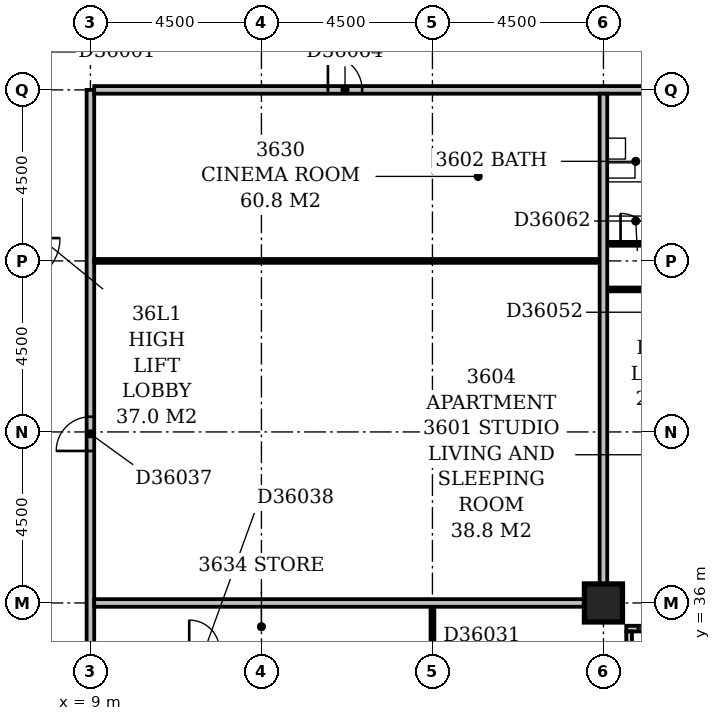
"""IFC4 building model, lengths in metres.
Left out: names, types, materials, properties, quantities, classifications, styles, units other than length and angle.
Written with IfcOpenShell. Run it as: python <this file> out.ifc"""

import sys

from ifc_helpers import new_model, si_unit, direction, frame, frame_2d, origin, origin_2d, place, context, subcontext, project, spatial, rectangle, extrude, element, fill, save


model = new_model("IFC4")
c1 = context("Model", 3, precision=1e-05, world=origin(), true_north=direction((0.0, 1.0)))
c2 = subcontext(c1, "Body", "Model", "MODEL_VIEW")
j1 = project(units=[si_unit("LENGTHUNIT", "METRE"), si_unit("PLANEANGLEUNIT", "RADIAN")], contexts=[c1])
p1 = place(None, origin())
s1 = spatial("IfcSite", under=j1, at=p1, CompositionType="ELEMENT")
p2 = place(p1, origin())
s2 = spatial("IfcBuilding", under=s1, at=p2, CompositionType="ELEMENT")
p3 = place(p2, frame((0.0, 0.0, 144.8)))
s3 = spatial("IfcBuildingStorey", under=s2, at=p3, CompositionType="ELEMENT", Elevation=144.8)
p4 = place(p3, frame((22.5, 36.0, -0.3), z_axis=(0.0, 0.0, 1.0), x_axis=(1.0, 0.0, 0.0)))
e1 = element("IfcColumn", 1, at=p4, inside=s3, PredefinedType="COLUMN", context=c2, shape_type="SweptSolid", body=[
    extrude(rectangle(XDim=1.0, YDim=1.0, at=origin_2d()), origin(), (0.0, 0.0, 1.0), 3.6),
])
p5 = place(p3, frame((23.175, 17.4, 0.0), z_axis=(0.0, 0.0, 1.0), x_axis=(0.0, 1.0, 0.0)))
e2 = element("IfcWall", 2, at=p5, inside=s3, PredefinedType="STANDARD", context=c2, shape_type="SweptSolid", body=[
    extrude(rectangle(XDim=17.85, YDim=0.15, at=frame_2d((8.925, 0.0))), origin(), (0.0, 0.0, 1.0), 2.7),
])
p6 = place(p5, frame((1.432, 0.0, 0.6)))
e3 = element("IfcOpeningElement", 3, at=p6, cuts=e2, PredefinedType="OPENING", context=c2, shape_type="SweptSolid", body=[
    extrude(rectangle(XDim=2.4, YDim=1.8, at=frame_2d((1.2, 0.9))), frame((0.0, 0.087, 0.0), z_axis=(0.0, -1.0, 0.0), x_axis=(1.0, 0.0, 0.0)), (0.0, 0.0, 1.0), 0.174),
])
p7 = place(p5, frame((6.15, 0.0, 0.6)))
e4 = element("IfcOpeningElement", 4, at=p7, cuts=e2, PredefinedType="OPENING", context=c2, shape_type="SweptSolid", body=[
    extrude(rectangle(XDim=2.4, YDim=1.8, at=frame_2d((1.2, 0.9))), frame((0.0, 0.087, 0.0), z_axis=(0.0, -1.0, 0.0), x_axis=(1.0, 0.0, 0.0)), (0.0, 0.0, 1.0), 0.174),
])
p8 = place(p5, frame((10.65, 0.0, 0.6)))
e5 = element("IfcOpeningElement", 5, at=p8, cuts=e2, PredefinedType="OPENING", context=c2, shape_type="SweptSolid", body=[
    extrude(rectangle(XDim=2.4, YDim=1.8, at=frame_2d((1.2, 0.9))), frame((0.0, 0.087, 0.0), z_axis=(0.0, -1.0, 0.0), x_axis=(1.0, 0.0, 0.0)), (0.0, 0.0, 1.0), 0.174),
])
p9 = place(p5, frame((15.15, 0.0, 0.6)))
e6 = element("IfcOpeningElement", 6, at=p9, cuts=e2, PredefinedType="OPENING", context=c2, shape_type="SweptSolid", body=[
    extrude(rectangle(XDim=2.4, YDim=1.8, at=frame_2d((1.2, 0.9))), frame((0.0, 0.087, 0.0), z_axis=(0.0, -1.0, 0.0), x_axis=(1.0, 0.0, 0.0)), (0.0, 0.0, 1.0), 0.174),
])
p10 = place(p3, frame((23.1, 35.325, 0.0), z_axis=(0.0, 0.0, 1.0), x_axis=(1.0, 0.0, 0.0)))
e7 = element("IfcWall", 7, at=p10, inside=s3, PredefinedType="STANDARD", context=c2, shape_type="SweptSolid", body=[
    extrude(rectangle(XDim=45.15, YDim=0.15, at=frame_2d((22.575, 0.0))), origin(), (0.0, 0.0, 1.0), 2.7),
])
p11 = place(p10, frame((0.306, 0.0, 0.6)))
e8 = element("IfcOpeningElement", 8, at=p11, cuts=e7, PredefinedType="OPENING", context=c2, shape_type="SweptSolid", body=[
    extrude(rectangle(XDim=2.4, YDim=1.8, at=frame_2d((1.2, 0.9))), frame((0.0, 0.087, 0.0), z_axis=(0.0, -1.0, 0.0), x_axis=(1.0, 0.0, 0.0)), (0.0, 0.0, 1.0), 0.174),
])
p12 = place(p10, frame((4.95, 0.0, 0.6)))
e9 = element("IfcOpeningElement", 9, at=p12, cuts=e7, PredefinedType="OPENING", context=c2, shape_type="SweptSolid", body=[
    extrude(rectangle(XDim=2.4, YDim=1.8, at=frame_2d((1.2, 0.9))), frame((0.0, 0.087, 0.0), z_axis=(0.0, -1.0, 0.0), x_axis=(1.0, 0.0, 0.0)), (0.0, 0.0, 1.0), 0.174),
])
p13 = place(p10, frame((9.45, 0.0, 0.6)))
e10 = element("IfcOpeningElement", 10, at=p13, cuts=e7, PredefinedType="OPENING", context=c2, shape_type="SweptSolid", body=[
    extrude(rectangle(XDim=2.4, YDim=1.8, at=frame_2d((1.2, 0.9))), frame((0.0, 0.087, 0.0), z_axis=(0.0, -1.0, 0.0), x_axis=(1.0, 0.0, 0.0)), (0.0, 0.0, 1.0), 0.174),
])
p14 = place(p10, frame((13.95, 0.0, 0.6)))
e11 = element("IfcOpeningElement", 11, at=p14, cuts=e7, PredefinedType="OPENING", context=c2, shape_type="SweptSolid", body=[
    extrude(rectangle(XDim=2.4, YDim=1.8, at=frame_2d((1.2, 0.9))), frame((0.0, 0.087, 0.0), z_axis=(0.0, -1.0, 0.0), x_axis=(1.0, 0.0, 0.0)), (0.0, 0.0, 1.0), 0.174),
])
p15 = place(p10, frame((18.45, 0.0, 0.6)))
e12 = element("IfcOpeningElement", 12, at=p15, cuts=e7, PredefinedType="OPENING", context=c2, shape_type="SweptSolid", body=[
    extrude(rectangle(XDim=2.4, YDim=1.8, at=frame_2d((1.2, 0.9))), frame((0.0, 0.087, 0.0), z_axis=(0.0, -1.0, 0.0), x_axis=(1.0, 0.0, 0.0)), (0.0, 0.0, 1.0), 0.174),
])
p16 = place(p10, frame((23.84, 0.0, 0.6)))
e13 = element("IfcOpeningElement", 13, at=p16, cuts=e7, PredefinedType="OPENING", context=c2, shape_type="SweptSolid", body=[
    extrude(rectangle(XDim=1.8, YDim=1.8, at=frame_2d((0.9, 0.9))), frame((0.0, 0.087, 0.0), z_axis=(0.0, -1.0, 0.0), x_axis=(1.0, 0.0, 0.0)), (0.0, 0.0, 1.0), 0.174),
])
p17 = place(p10, frame((27.45, 0.0, 0.6)))
e14 = element("IfcOpeningElement", 14, at=p17, cuts=e7, PredefinedType="OPENING", context=c2, shape_type="SweptSolid", body=[
    extrude(rectangle(XDim=2.4, YDim=1.8, at=frame_2d((1.2, 0.9))), frame((0.0, 0.087, 0.0), z_axis=(0.0, -1.0, 0.0), x_axis=(1.0, 0.0, 0.0)), (0.0, 0.0, 1.0), 0.174),
])
p18 = place(p10, frame((32.27, 0.0, 0.6)))
e15 = element("IfcOpeningElement", 15, at=p18, cuts=e7, PredefinedType="OPENING", context=c2, shape_type="SweptSolid", body=[
    extrude(rectangle(XDim=2.4, YDim=1.8, at=frame_2d((1.2, 0.9))), frame((0.0, 0.087, 0.0), z_axis=(0.0, -1.0, 0.0), x_axis=(1.0, 0.0, 0.0)), (0.0, 0.0, 1.0), 0.174),
])
p19 = place(p10, frame((36.45, 0.0, 0.6)))
e16 = element("IfcOpeningElement", 16, at=p19, cuts=e7, PredefinedType="OPENING", context=c2, shape_type="SweptSolid", body=[
    extrude(rectangle(XDim=2.4, YDim=1.8, at=frame_2d((1.2, 0.9))), frame((0.0, 0.087, 0.0), z_axis=(0.0, -1.0, 0.0), x_axis=(1.0, 0.0, 0.0)), (0.0, 0.0, 1.0), 0.174),
])
p20 = place(p10, frame((40.95, 0.0, 0.6)))
e17 = element("IfcOpeningElement", 17, at=p20, cuts=e7, PredefinedType="OPENING", context=c2, shape_type="SweptSolid", body=[
    extrude(rectangle(XDim=2.4, YDim=1.8, at=frame_2d((1.2, 0.9))), frame((0.0, 0.087, 0.0), z_axis=(0.0, -1.0, 0.0), x_axis=(1.0, 0.0, 0.0)), (0.0, 0.0, 1.0), 0.174),
])
p21 = place(p3, frame((18.0, 31.6, 0.0), z_axis=(0.0, 0.0, 1.0), x_axis=(0.0, 1.0, 0.0)))
e18 = element("IfcWall", 18, at=p21, inside=s3, PredefinedType="PARTITIONING", context=c2, shape_type="SweptSolid", body=[
    extrude(rectangle(XDim=4.3, YDim=0.1, at=frame_2d((2.15, 0.0))), origin(), (0.0, 0.0, 1.0), 3.3),
])
p22 = place(p21, frame((1.7, 0.0, 0.0)))
e19 = element("IfcOpeningElement", 19, at=p22, cuts=e18, PredefinedType="OPENING", context=c2, shape_type="SweptSolid", body=[
    extrude(rectangle(XDim=0.9, YDim=2.1, at=frame_2d((0.45, 1.05))), frame((0.0, 0.062, 0.0), z_axis=(0.0, -1.0, 0.0), x_axis=(1.0, 0.0, 0.0)), (0.0, 0.0, 1.0), 0.124),
])
p23 = place(p3, frame((9.0, 34.75, 0.0), z_axis=(0.0, 0.0, 1.0), x_axis=(0.0, 1.0, 0.0)))
e20 = element("IfcWall", 20, at=p23, inside=s3, PredefinedType="PARTITIONING", context=c2, shape_type="SweptSolid", body=[
    extrude(rectangle(XDim=14.75, YDim=0.2, at=frame_2d((7.375, 0.0))), origin(), (0.0, 0.0, 1.0), 3.3),
])
p24 = place(p23, frame((5.25, 0.0, 0.0)))
e21 = element("IfcOpeningElement", 21, at=p24, cuts=e20, PredefinedType="OPENING", context=c2, shape_type="SweptSolid", body=[
    extrude(rectangle(XDim=0.9, YDim=2.1, at=frame_2d((0.45, 1.05))), frame((0.0, 0.112, 0.0), z_axis=(0.0, -1.0, 0.0), x_axis=(1.0, 0.0, 0.0)), (0.0, 0.0, 1.0), 0.224),
])
for number, where, z_axis, x_axis in (
    (22, (9.1, 36.0, 0.0), (0.0, 0.0, 1.0), (1.0, 0.0, 0.0)),
    (23, (22.5, 36.5, 0.0), (0.0, 0.0, 1.0), (0.0, 1.0, 0.0)),
):
    element("IfcWall", number, at=place(p3, frame(where, z_axis=z_axis, x_axis=x_axis)), inside=s3, PredefinedType="PARTITIONING", context=c2, shape_type="SweptSolid", body=[
        extrude(rectangle(XDim=12.9, YDim=0.2, at=frame_2d((6.45, 0.0))), origin(), (0.0, 0.0, 1.0), 3.3),
    ])
p25 = place(p3, frame((22.6, 44.25, 0.0), z_axis=(0.0, 0.0, 1.0), x_axis=(1.0, 0.0, 0.0)))
e24 = element("IfcWall", 24, at=p25, inside=s3, PredefinedType="PARTITIONING", context=c2, shape_type="SweptSolid", body=[
    extrude(rectangle(XDim=4.3, YDim=0.1, at=frame_2d((2.15, 0.0))), origin(), (0.0, 0.0, 1.0), 3.3),
])
p26 = place(p25, frame((1.7, 0.0, 0.0)))
e25 = element("IfcOpeningElement", 25, at=p26, cuts=e24, PredefinedType="OPENING", context=c2, shape_type="SweptSolid", body=[
    extrude(rectangle(XDim=0.9, YDim=2.1, at=frame_2d((0.45, 1.05))), frame((0.0, 0.062, 0.0), z_axis=(0.0, -1.0, 0.0), x_axis=(1.0, 0.0, 0.0)), (0.0, 0.0, 1.0), 0.124),
])
p27 = place(p3, frame((9.1, 45.0, 0.0), z_axis=(0.0, 0.0, 1.0), x_axis=(1.0, 0.0, 0.0)))
e26 = element("IfcWall", 26, at=p27, inside=s3, PredefinedType="PARTITIONING", context=c2, shape_type="SweptSolid", body=[
    extrude(rectangle(XDim=13.3, YDim=0.1, at=frame_2d((6.65, 0.0))), origin(), (0.0, 0.0, 1.0), 3.3),
])
p28 = place(p3, frame((22.6, 45.45, 0.0), z_axis=(0.0, 0.0, 1.0), x_axis=(1.0, 0.0, 0.0)))
e27 = element("IfcWall", 27, at=p28, inside=s3, PredefinedType="PARTITIONING", context=c2, shape_type="SweptSolid", body=[
    extrude(rectangle(XDim=1.55, YDim=0.1, at=frame_2d((0.775, 0.0))), origin(), (0.0, 0.0, 1.0), 3.3),
])
p29 = place(p28, frame((0.35, 0.0, 0.0)))
e28 = element("IfcOpeningElement", 28, at=p29, cuts=e27, PredefinedType="OPENING", context=c2, shape_type="SweptSolid", body=[
    extrude(rectangle(XDim=0.8, YDim=2.1, at=frame_2d((0.4, 1.05))), frame((0.0, 0.062, 0.0), z_axis=(0.0, -1.0, 0.0), x_axis=(1.0, 0.0, 0.0)), (0.0, 0.0, 1.0), 0.124),
])
p30 = place(p3, frame((9.1, 49.5, 0.0), z_axis=(0.0, 0.0, 1.0), x_axis=(1.0, 0.0, 0.0)))
e29 = element("IfcWall", 29, at=p30, inside=s3, PredefinedType="PARTITIONING", context=c2, shape_type="SweptSolid", body=[
    extrude(rectangle(XDim=19.05, YDim=0.2, at=frame_2d((9.525, 0.0))), origin(), (0.0, 0.0, 1.0), 3.3),
])
p31 = place(p30, frame((15.35, 0.0, 0.0)))
e30 = element("IfcOpeningElement", 30, at=p31, cuts=e29, PredefinedType="OPENING", context=c2, shape_type="SweptSolid", body=[
    extrude(rectangle(XDim=1.0, YDim=2.1, at=frame_2d((0.5, 1.05))), frame((0.0, 0.112, 0.0), z_axis=(0.0, -1.0, 0.0), x_axis=(1.0, 0.0, 0.0)), (0.0, 0.0, 1.0), 0.224),
])
p32 = place(p30, frame((6.15, 0.0, 0.0)))
e31 = element("IfcOpeningElement", 31, at=p32, cuts=e29, PredefinedType="OPENING", context=c2, shape_type="SweptSolid", body=[
    extrude(rectangle(XDim=0.9, YDim=2.1, at=frame_2d((0.45, 1.05))), frame((0.0, 0.112, 0.0), z_axis=(0.0, -1.0, 0.0), x_axis=(1.0, 0.0, 0.0)), (0.0, 0.0, 1.0), 0.224),
])
p33 = place(p11, origin())
e32 = element("IfcWindow", 32, at=p33, inside=s3, PartitioningType="SINGLE_PANEL", PredefinedType="WINDOW", context=c2, shape_type="SweptSolid", body=[
    extrude(rectangle(XDim=2.4, YDim=1.8, at=frame_2d((1.2, 0.9))), frame((0.0, 0.03, 0.0), z_axis=(0.0, -1.0, 0.0), x_axis=(1.0, 0.0, 0.0)), (0.0, 0.0, 1.0), 0.06),
])
fill(e8, e32)
p34 = place(p24, origin())
e33 = element("IfcDoor", 33, at=p34, inside=s3, OperationType="SINGLE_SWING_LEFT", PredefinedType="DOOR", context=c2, shape_type="SweptSolid", body=[
    extrude(rectangle(XDim=0.9, YDim=2.1, at=frame_2d((0.45, 1.05))), frame((0.0, 0.025, 0.0), z_axis=(0.0, -1.0, 0.0), x_axis=(1.0, 0.0, 0.0)), (0.0, 0.0, 1.0), 0.05),
])
fill(e21, e33)
p35 = place(p29, origin())
e34 = element("IfcDoor", 34, at=p35, inside=s3, OperationType="SINGLE_SWING_LEFT", PredefinedType="DOOR", context=c2, shape_type="SweptSolid", body=[
    extrude(rectangle(XDim=0.8, YDim=2.1, at=frame_2d((0.4, 1.05))), frame((0.0, 0.025, 0.0), z_axis=(0.0, -1.0, 0.0), x_axis=(1.0, 0.0, 0.0)), (0.0, 0.0, 1.0), 0.05),
])
fill(e28, e34)
p36 = place(p32, origin())
e35 = element("IfcDoor", 35, at=p36, inside=s3, OperationType="SINGLE_SWING_LEFT", PredefinedType="DOOR", context=c2, shape_type="SweptSolid", body=[
    extrude(rectangle(XDim=0.9, YDim=2.1, at=frame_2d((0.45, 1.05))), frame((0.0, 0.025, 0.0), z_axis=(0.0, -1.0, 0.0), x_axis=(1.0, 0.0, 0.0)), (0.0, 0.0, 1.0), 0.05),
])
fill(e31, e35)
save(model, sys.argv[1])
